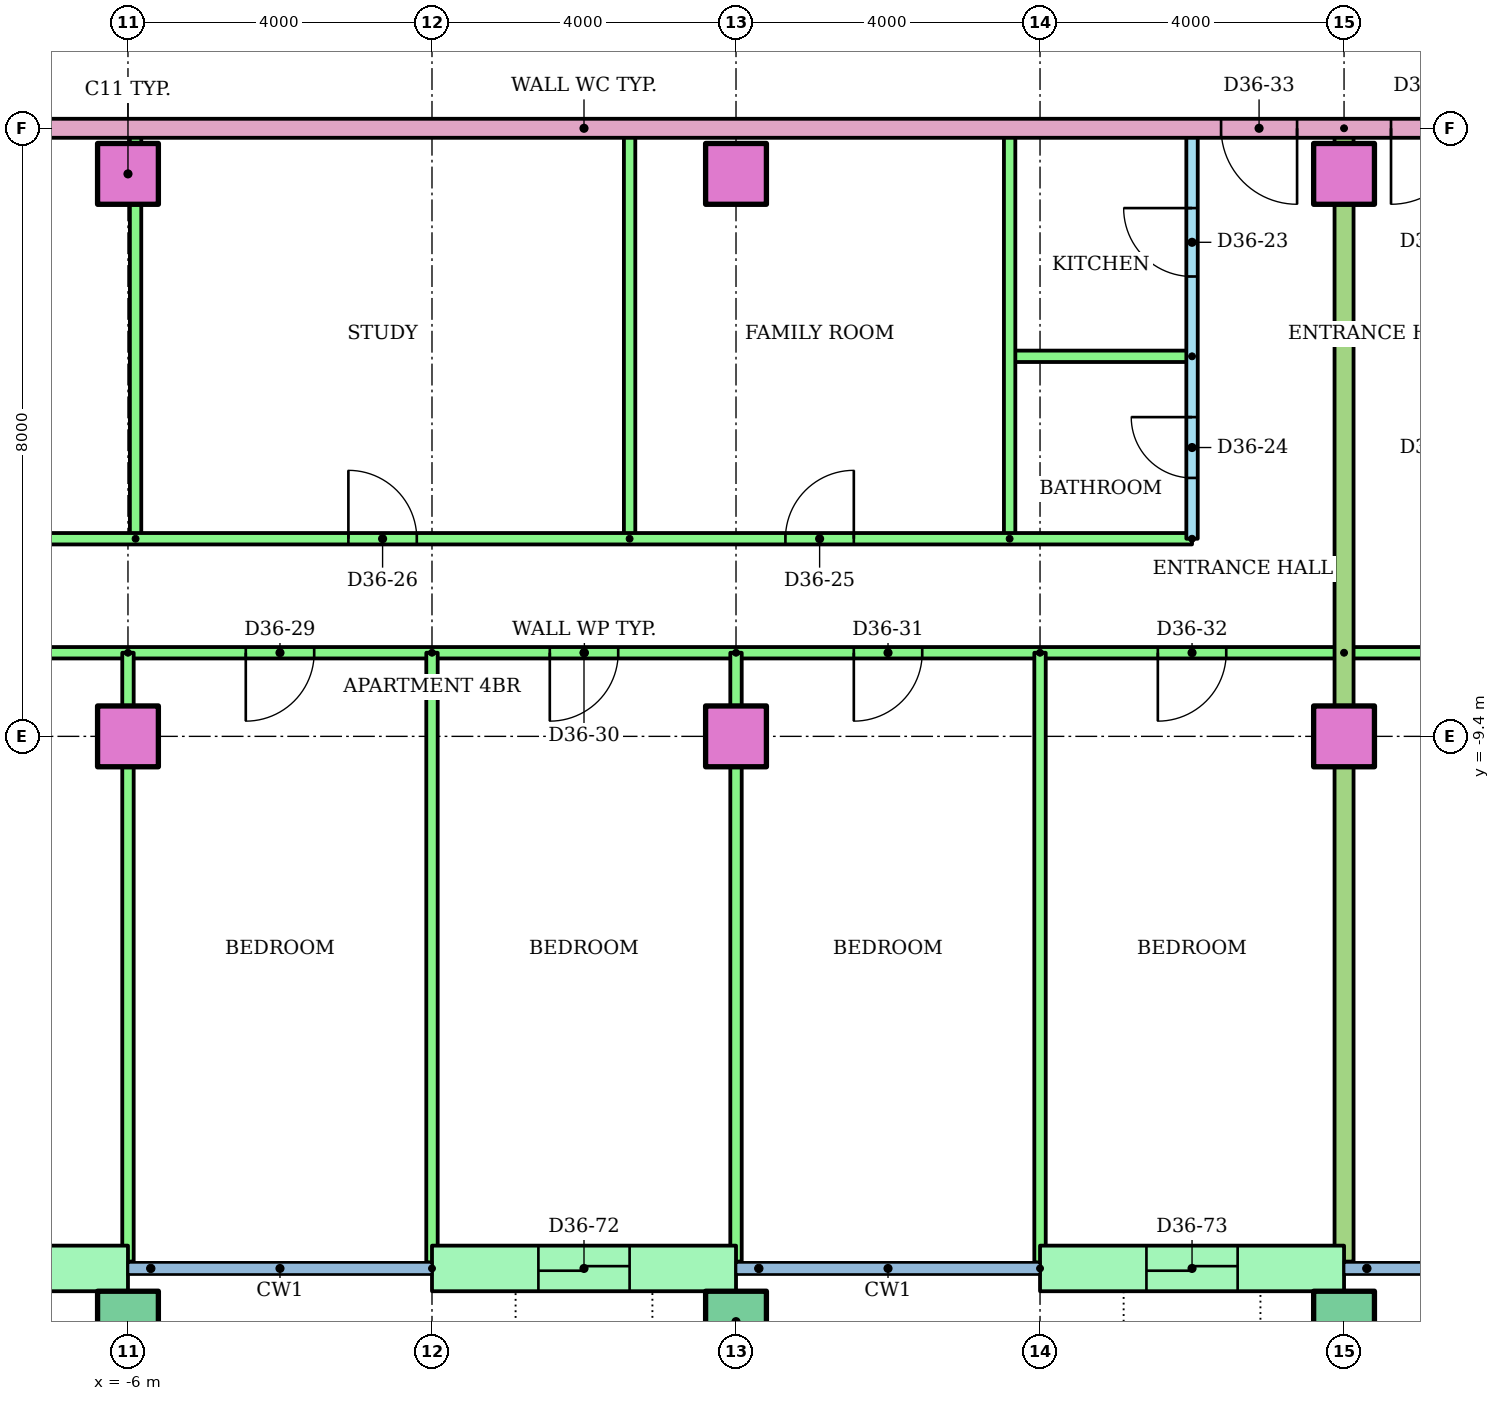
"""IFC4 building model, lengths in metres.
Left out: names, types, materials, properties, quantities, classifications, styles, units other than length and angle.
Written with IfcOpenShell. Run it as: python <this file> out.ifc"""

import sys

from ifc_helpers import new_model, si_unit, direction, frame, frame_2d, origin, origin_2d, place, context, subcontext, project, spatial, rectangle, hollow_rectangle, extrude, element, fill, save


model = new_model("IFC4")
c1 = context("Model", 3, precision=1e-05, world=origin(), true_north=direction((0.0, 1.0)))
c2 = subcontext(c1, "Body", "Model", "MODEL_VIEW")
j1 = project(units=[si_unit("LENGTHUNIT", "METRE"), si_unit("PLANEANGLEUNIT", "RADIAN")], contexts=[c1])
p1 = place(None, origin())
s1 = spatial("IfcSite", under=j1, at=p1, CompositionType="ELEMENT")
p2 = place(p1, origin())
s2 = spatial("IfcBuilding", under=s1, at=p2, CompositionType="ELEMENT")
p3 = place(p2, frame((0.0, 0.0, 139.0)))
s3 = spatial("IfcBuildingStorey", under=s2, at=p3, CompositionType="ELEMENT", Elevation=139.0)
for number, where in (
    (1, (-6.0, -17.1, 0.0)),
    (2, (2.0, -17.1, 0.0)),
    (3, (10.0, -17.1, 0.0)),
):
    element("IfcColumn", number, at=place(p3, frame(where)), inside=s3, PredefinedType="COLUMN", context=c2, shape_type="SweptSolid", body=[
        extrude(hollow_rectangle(XDim=0.8, YDim=0.8, WallThickness=0.04, at=origin_2d()), origin(), (0.0, 0.0, 1.0), 3.2),
    ])
for number, where in (
    (4, (-6.0, -9.4, 0.0)),
    (5, (2.0, -9.4, 0.0)),
    (6, (10.0, -9.4, 0.0)),
    (7, (-6.0, -2.0, 0.0)),
    (8, (2.0, -2.0, 0.0)),
    (9, (10.0, -2.0, 0.0)),
):
    element("IfcColumn", number, at=place(p3, frame(where)), inside=s3, PredefinedType="COLUMN", context=c2, shape_type="SweptSolid", body=[
        extrude(rectangle(XDim=0.8, YDim=0.8, at=origin_2d()), origin(), (0.0, 0.0, 1.0), 3.2),
    ])
p4 = place(p3, frame((-10.0, -16.4, 0.0)))
e10 = element("IfcWall", 10, at=p4, inside=s3, PredefinedType="STANDARD", context=c2, shape_type="SweptSolid", body=[
    extrude(rectangle(XDim=4.0, YDim=0.6, at=frame_2d((2.0, 0.0))), origin(), (0.0, 0.0, 1.0), 2.92),
])
p5 = place(p4, frame((1.4, 0.0, 0.0)))
e11 = element("IfcOpeningElement", 11, at=p5, cuts=e10, PredefinedType="OPENING", context=c2, shape_type="SweptSolid", body=[
    extrude(rectangle(XDim=1.2, YDim=2.1, at=frame_2d((0.6, 1.05))), frame((0.0, 0.31, 0.0), z_axis=(0.0, -1.0, 0.0), x_axis=(1.0, 0.0, 0.0)), (0.0, 0.0, 1.0), 0.62),
])
p6 = place(p3, frame((-2.0, -16.4, 0.0)))
e12 = element("IfcWall", 12, at=p6, inside=s3, PredefinedType="STANDARD", context=c2, shape_type="SweptSolid", body=[
    extrude(rectangle(XDim=4.0, YDim=0.6, at=frame_2d((2.0, 0.0))), origin(), (0.0, 0.0, 1.0), 2.92),
])
p7 = place(p6, frame((1.4, 0.0, 0.0)))
e13 = element("IfcOpeningElement", 13, at=p7, cuts=e12, PredefinedType="OPENING", context=c2, shape_type="SweptSolid", body=[
    extrude(rectangle(XDim=1.2, YDim=2.1, at=frame_2d((0.6, 1.05))), frame((0.0, 0.31, 0.0), z_axis=(0.0, -1.0, 0.0), x_axis=(1.0, 0.0, 0.0)), (0.0, 0.0, 1.0), 0.62),
])
p8 = place(p3, frame((6.0, -16.4, 0.0)))
e14 = element("IfcWall", 14, at=p8, inside=s3, PredefinedType="STANDARD", context=c2, shape_type="SweptSolid", body=[
    extrude(rectangle(XDim=4.0, YDim=0.6, at=frame_2d((2.0, 0.0))), origin(), (0.0, 0.0, 1.0), 2.92),
])
p9 = place(p8, frame((1.4, 0.0, 0.0)))
e15 = element("IfcOpeningElement", 15, at=p9, cuts=e14, PredefinedType="OPENING", context=c2, shape_type="SweptSolid", body=[
    extrude(rectangle(XDim=1.2, YDim=2.1, at=frame_2d((0.6, 1.05))), frame((0.0, 0.31, 0.0), z_axis=(0.0, -1.0, 0.0), x_axis=(1.0, 0.0, 0.0)), (0.0, 0.0, 1.0), 0.62),
])
p10 = place(p3, frame((8.0, -6.8, 0.0), z_axis=(0.0, 0.0, 1.0), x_axis=(0.0, 1.0, 0.0)))
e16 = element("IfcWall", 16, at=p10, inside=s3, PredefinedType="PARTITIONING", context=c2, shape_type="SweptSolid", body=[
    extrude(rectangle(XDim=5.4, YDim=0.15, at=frame_2d((2.7, 0.0))), origin(), (0.0, 0.0, 1.0), 2.4),
])
p11 = place(p10, frame((3.45, 0.0, 0.0)))
e17 = element("IfcOpeningElement", 17, at=p11, cuts=e16, PredefinedType="OPENING", context=c2, shape_type="SweptSolid", body=[
    extrude(rectangle(XDim=0.9, YDim=2.1, at=frame_2d((0.45, 1.05))), frame((0.0, 0.085, 0.0), z_axis=(0.0, -1.0, 0.0), x_axis=(1.0, 0.0, 0.0)), (0.0, 0.0, 1.0), 0.17),
])
p12 = place(p10, frame((0.8, 0.0, 0.0)))
e18 = element("IfcOpeningElement", 18, at=p12, cuts=e16, PredefinedType="OPENING", context=c2, shape_type="SweptSolid", body=[
    extrude(rectangle(XDim=0.8, YDim=2.1, at=frame_2d((0.4, 1.05))), frame((0.0, 0.085, 0.0), z_axis=(0.0, -1.0, 0.0), x_axis=(1.0, 0.0, 0.0)), (0.0, 0.0, 1.0), 0.17),
])
p13 = place(p3, frame((8.0, -4.4, 0.0), z_axis=(0.0, 0.0, 1.0), x_axis=(-1.0, 0.0, 0.0)))
e19 = element("IfcWall", 19, at=p13, inside=s3, PredefinedType="PARTITIONING", context=c2, shape_type="SweptSolid", body=[
    extrude(rectangle(XDim=2.4, YDim=0.15, at=frame_2d((1.2, 0.0))), origin(), (0.0, 0.0, 1.0), 2.4),
])
for number, where, z_axis, x_axis in (
    (20, (5.6, -6.8, 0.0), (0.0, 0.0, 1.0), (0.0, 1.0, 0.0)),
    (21, (0.6, -6.8, 0.0), (0.0, 0.0, 1.0), (0.0, 1.0, 0.0)),
    (22, (-5.9, -6.8, 0.0), (0.0, 0.0, 1.0), (0.0, 1.0, 0.0)),
):
    element("IfcWall", number, at=place(p3, frame(where, z_axis=z_axis, x_axis=x_axis)), inside=s3, PredefinedType="PARTITIONING", context=c2, shape_type="SweptSolid", body=[
        extrude(rectangle(XDim=5.4, YDim=0.15, at=frame_2d((2.7, 0.0))), origin(), (0.0, 0.0, 1.0), 2.4),
    ])
p14 = place(p3, frame((-14.0, -6.8, 0.0)))
e23 = element("IfcWall", 23, at=p14, inside=s3, PredefinedType="PARTITIONING", context=c2, shape_type="SweptSolid", body=[
    extrude(rectangle(XDim=22.0, YDim=0.15, at=frame_2d((11.0, 0.0))), origin(), (0.0, 0.0, 1.0), 2.4),
])
p15 = place(p14, frame((16.65, 0.0, 0.0)))
e24 = element("IfcOpeningElement", 24, at=p15, cuts=e23, PredefinedType="OPENING", context=c2, shape_type="SweptSolid", body=[
    extrude(rectangle(XDim=0.9, YDim=2.1, at=frame_2d((0.45, 1.05))), frame((0.0, 0.085, 0.0), z_axis=(0.0, -1.0, 0.0), x_axis=(1.0, 0.0, 0.0)), (0.0, 0.0, 1.0), 0.17),
])
p16 = place(p14, frame((10.9, 0.0, 0.0)))
e25 = element("IfcOpeningElement", 25, at=p16, cuts=e23, PredefinedType="OPENING", context=c2, shape_type="SweptSolid", body=[
    extrude(rectangle(XDim=0.9, YDim=2.1, at=frame_2d((0.45, 1.05))), frame((0.0, 0.085, 0.0), z_axis=(0.0, -1.0, 0.0), x_axis=(1.0, 0.0, 0.0)), (0.0, 0.0, 1.0), 0.17),
])
p17 = place(p14, frame((3.6, 0.0, 0.0)))
e26 = element("IfcOpeningElement", 26, at=p17, cuts=e23, PredefinedType="OPENING", context=c2, shape_type="SweptSolid", body=[
    extrude(rectangle(XDim=0.9, YDim=2.1, at=frame_2d((0.45, 1.05))), frame((0.0, 0.085, 0.0), z_axis=(0.0, -1.0, 0.0), x_axis=(1.0, 0.0, 0.0)), (0.0, 0.0, 1.0), 0.17),
])
p18 = place(p3, frame((10.0, -8.3, 0.0), z_axis=(0.0, 0.0, 1.0), x_axis=(-1.0, 0.0, 0.0)))
e27 = element("IfcWall", 27, at=p18, inside=s3, PredefinedType="PARTITIONING", context=c2, shape_type="SweptSolid", body=[
    extrude(rectangle(XDim=24.0, YDim=0.15, at=frame_2d((12.0, 0.0))), origin(), (0.0, 0.0, 1.0), 2.4),
])
p19 = place(p18, frame((19.5, 0.0, 0.0)))
e28 = element("IfcOpeningElement", 28, at=p19, cuts=e27, PredefinedType="OPENING", context=c2, shape_type="SweptSolid", body=[
    extrude(rectangle(XDim=1.0, YDim=2.1, at=frame_2d((0.5, 1.05))), frame((0.0, 0.085, 0.0), z_axis=(0.0, -1.0, 0.0), x_axis=(1.0, 0.0, 0.0)), (0.0, 0.0, 1.0), 0.17),
])
p20 = place(p18, frame((13.55, 0.0, 0.0)))
e29 = element("IfcOpeningElement", 29, at=p20, cuts=e27, PredefinedType="OPENING", context=c2, shape_type="SweptSolid", body=[
    extrude(rectangle(XDim=0.9, YDim=2.1, at=frame_2d((0.45, 1.05))), frame((0.0, 0.085, 0.0), z_axis=(0.0, -1.0, 0.0), x_axis=(1.0, 0.0, 0.0)), (0.0, 0.0, 1.0), 0.17),
])
p21 = place(p18, frame((9.55, 0.0, 0.0)))
e30 = element("IfcOpeningElement", 30, at=p21, cuts=e27, PredefinedType="OPENING", context=c2, shape_type="SweptSolid", body=[
    extrude(rectangle(XDim=0.9, YDim=2.1, at=frame_2d((0.45, 1.05))), frame((0.0, 0.085, 0.0), z_axis=(0.0, -1.0, 0.0), x_axis=(1.0, 0.0, 0.0)), (0.0, 0.0, 1.0), 0.17),
])
p22 = place(p18, frame((5.55, 0.0, 0.0)))
e31 = element("IfcOpeningElement", 31, at=p22, cuts=e27, PredefinedType="OPENING", context=c2, shape_type="SweptSolid", body=[
    extrude(rectangle(XDim=0.9, YDim=2.1, at=frame_2d((0.45, 1.05))), frame((0.0, 0.085, 0.0), z_axis=(0.0, -1.0, 0.0), x_axis=(1.0, 0.0, 0.0)), (0.0, 0.0, 1.0), 0.17),
])
p23 = place(p18, frame((1.55, 0.0, 0.0)))
e32 = element("IfcOpeningElement", 32, at=p23, cuts=e27, PredefinedType="OPENING", context=c2, shape_type="SweptSolid", body=[
    extrude(rectangle(XDim=0.9, YDim=2.1, at=frame_2d((0.45, 1.05))), frame((0.0, 0.085, 0.0), z_axis=(0.0, -1.0, 0.0), x_axis=(1.0, 0.0, 0.0)), (0.0, 0.0, 1.0), 0.17),
])
p24 = place(p3, frame((-6.0, -8.3, 0.0), z_axis=(0.0, 0.0, 1.0), x_axis=(0.0, -1.0, 0.0)))
e33 = element("IfcWall", 33, at=p24, inside=s3, PredefinedType="PARTITIONING", context=c2, shape_type="SweptSolid", body=[
    extrude(rectangle(XDim=8.01, YDim=0.15, at=frame_2d((4.005, 0.0))), origin(), (0.0, 0.0, 1.0), 2.4),
])
p25 = place(p3, frame((-2.0, -8.3, 0.0), z_axis=(0.0, 0.0, 1.0), x_axis=(0.0, -1.0, 0.0)))
e34 = element("IfcWall", 34, at=p25, inside=s3, PredefinedType="PARTITIONING", context=c2, shape_type="SweptSolid", body=[
    extrude(rectangle(XDim=8.021, YDim=0.15, at=frame_2d((4.01, 0.0))), origin(), (0.0, 0.0, 1.0), 2.4),
])
p26 = place(p3, frame((2.0, -8.3, 0.0), z_axis=(0.0, 0.0, 1.0), x_axis=(0.0, -1.0, 0.0)))
e35 = element("IfcWall", 35, at=p26, inside=s3, PredefinedType="PARTITIONING", context=c2, shape_type="SweptSolid", body=[
    extrude(rectangle(XDim=8.01, YDim=0.15, at=frame_2d((4.005, 0.0))), origin(), (0.0, 0.0, 1.0), 2.4),
])
p27 = place(p3, frame((6.0, -8.3, 0.0), z_axis=(0.0, 0.0, 1.0), x_axis=(0.0, -1.0, 0.0)))
e36 = element("IfcWall", 36, at=p27, inside=s3, PredefinedType="PARTITIONING", context=c2, shape_type="SweptSolid", body=[
    extrude(rectangle(XDim=8.021, YDim=0.15, at=frame_2d((4.01, 0.0))), origin(), (0.0, 0.0, 1.0), 2.4),
])
p28 = place(p3, frame((32.72, -8.3, 0.0), z_axis=(0.0, 0.0, 1.0), x_axis=(-1.0, 0.0, 0.0)))
e37 = element("IfcWall", 37, at=p28, inside=s3, PredefinedType="PARTITIONING", context=c2, shape_type="SweptSolid", body=[
    extrude(rectangle(XDim=22.72, YDim=0.15, at=frame_2d((11.36, 0.0))), origin(), (0.0, 0.0, 1.0), 2.4),
])
p29 = place(p28, frame((20.27, 0.0, 0.0)))
e38 = element("IfcOpeningElement", 38, at=p29, cuts=e37, PredefinedType="OPENING", context=c2, shape_type="SweptSolid", body=[
    extrude(rectangle(XDim=0.9, YDim=2.1, at=frame_2d((0.45, 1.05))), frame((0.0, 0.085, 0.0), z_axis=(0.0, -1.0, 0.0), x_axis=(1.0, 0.0, 0.0)), (0.0, 0.0, 1.0), 0.17),
])
p30 = place(p28, frame((16.27, 0.0, 0.0)))
e39 = element("IfcOpeningElement", 39, at=p30, cuts=e37, PredefinedType="OPENING", context=c2, shape_type="SweptSolid", body=[
    extrude(rectangle(XDim=0.9, YDim=2.1, at=frame_2d((0.45, 1.05))), frame((0.0, 0.085, 0.0), z_axis=(0.0, -1.0, 0.0), x_axis=(1.0, 0.0, 0.0)), (0.0, 0.0, 1.0), 0.17),
])
p31 = place(p28, frame((12.27, 0.0, 0.0)))
e40 = element("IfcOpeningElement", 40, at=p31, cuts=e37, PredefinedType="OPENING", context=c2, shape_type="SweptSolid", body=[
    extrude(rectangle(XDim=0.9, YDim=2.1, at=frame_2d((0.45, 1.05))), frame((0.0, 0.085, 0.0), z_axis=(0.0, -1.0, 0.0), x_axis=(1.0, 0.0, 0.0)), (0.0, 0.0, 1.0), 0.17),
])
p32 = place(p28, frame((8.22, 0.0, 0.0)))
e41 = element("IfcOpeningElement", 41, at=p32, cuts=e37, PredefinedType="OPENING", context=c2, shape_type="SweptSolid", body=[
    extrude(rectangle(XDim=1.0, YDim=2.1, at=frame_2d((0.5, 1.05))), frame((0.0, 0.085, 0.0), z_axis=(0.0, -1.0, 0.0), x_axis=(1.0, 0.0, 0.0)), (0.0, 0.0, 1.0), 0.17),
])
p33 = place(p28, frame((3.02, 0.0, 0.0)))
e42 = element("IfcOpeningElement", 42, at=p33, cuts=e37, PredefinedType="OPENING", context=c2, shape_type="SweptSolid", body=[
    extrude(rectangle(XDim=0.9, YDim=2.1, at=frame_2d((0.45, 1.05))), frame((0.0, 0.085, 0.0), z_axis=(0.0, -1.0, 0.0), x_axis=(1.0, 0.0, 0.0)), (0.0, 0.0, 1.0), 0.17),
])
p34 = place(p3, frame((10.0, -1.4, 0.0), z_axis=(0.0, 0.0, 1.0), x_axis=(0.0, -1.0, 0.0)))
e43 = element("IfcWall", 43, at=p34, inside=s3, PredefinedType="PARTITIONING", context=c2, shape_type="SweptSolid", body=[
    extrude(rectangle(XDim=14.91, YDim=0.25, at=frame_2d((7.455, 0.0))), origin(), (0.0, 0.0, 1.0), 2.4),
])
p35 = place(p3, frame((14.0, -1.4, 0.0), z_axis=(0.0, 0.0, 1.0), x_axis=(-1.0, 0.0, 0.0)))
e44 = element("IfcWall", 44, at=p35, inside=s3, PredefinedType="PARTITIONING", context=c2, shape_type="SweptSolid", body=[
    extrude(rectangle(XDim=28.0, YDim=0.25, at=frame_2d((14.0, 0.0))), origin(), (0.0, 0.0, 1.0), 2.4),
])
p36 = place(p35, frame((4.618, 0.0, 0.0)))
e45 = element("IfcOpeningElement", 45, at=p36, cuts=e44, PredefinedType="OPENING", context=c2, shape_type="SweptSolid", body=[
    extrude(rectangle(XDim=1.0, YDim=2.1, at=frame_2d((0.5, 1.05))), frame((0.0, 0.135, 0.0), z_axis=(0.0, -1.0, 0.0), x_axis=(1.0, 0.0, 0.0)), (0.0, 0.0, 1.0), 0.27),
])
p37 = place(p35, frame((2.382, 0.0, 0.0)))
e46 = element("IfcOpeningElement", 46, at=p37, cuts=e44, PredefinedType="OPENING", context=c2, shape_type="SweptSolid", body=[
    extrude(rectangle(XDim=1.0, YDim=2.1, at=frame_2d((0.5, 1.05))), frame((0.0, 0.135, 0.0), z_axis=(0.0, -1.0, 0.0), x_axis=(1.0, 0.0, 0.0)), (0.0, 0.0, 1.0), 0.27),
])
p38 = place(p11, origin())
e47 = element("IfcDoor", 47, at=p38, inside=s3, OperationType="SINGLE_SWING_RIGHT", PredefinedType="DOOR", context=c2, shape_type="SweptSolid", body=[
    extrude(rectangle(XDim=0.9, YDim=2.1, at=frame_2d((0.45, 1.05))), frame((0.0, 0.025, 0.0), z_axis=(0.0, -1.0, 0.0), x_axis=(1.0, 0.0, 0.0)), (0.0, 0.0, 1.0), 0.05),
])
fill(e17, e47)
p39 = place(p12, origin())
e48 = element("IfcDoor", 48, at=p39, inside=s3, OperationType="SINGLE_SWING_RIGHT", PredefinedType="DOOR", context=c2, shape_type="SweptSolid", body=[
    extrude(rectangle(XDim=0.8, YDim=2.1, at=frame_2d((0.4, 1.05))), frame((0.0, 0.025, 0.0), z_axis=(0.0, -1.0, 0.0), x_axis=(1.0, 0.0, 0.0)), (0.0, 0.0, 1.0), 0.05),
])
fill(e18, e48)
p40 = place(p15, origin())
e49 = element("IfcDoor", 49, at=p40, inside=s3, OperationType="SINGLE_SWING_RIGHT", PredefinedType="DOOR", context=c2, shape_type="SweptSolid", body=[
    extrude(rectangle(XDim=0.9, YDim=2.1, at=frame_2d((0.45, 1.05))), frame((0.0, 0.025, 0.0), z_axis=(0.0, -1.0, 0.0), x_axis=(1.0, 0.0, 0.0)), (0.0, 0.0, 1.0), 0.05),
])
fill(e24, e49)
p41 = place(p16, origin())
e50 = element("IfcDoor", 50, at=p41, inside=s3, OperationType="SINGLE_SWING_LEFT", PredefinedType="DOOR", context=c2, shape_type="SweptSolid", body=[
    extrude(rectangle(XDim=0.9, YDim=2.1, at=frame_2d((0.45, 1.05))), frame((0.0, 0.025, 0.0), z_axis=(0.0, -1.0, 0.0), x_axis=(1.0, 0.0, 0.0)), (0.0, 0.0, 1.0), 0.05),
])
fill(e25, e50)
p42 = place(p20, origin())
e51 = element("IfcDoor", 51, at=p42, inside=s3, OperationType="SINGLE_SWING_RIGHT", PredefinedType="DOOR", context=c2, shape_type="SweptSolid", body=[
    extrude(rectangle(XDim=0.9, YDim=2.1, at=frame_2d((0.45, 1.05))), frame((0.0, 0.025, 0.0), z_axis=(0.0, -1.0, 0.0), x_axis=(1.0, 0.0, 0.0)), (0.0, 0.0, 1.0), 0.05),
])
fill(e29, e51)
p43 = place(p21, origin())
e52 = element("IfcDoor", 52, at=p43, inside=s3, OperationType="SINGLE_SWING_RIGHT", PredefinedType="DOOR", context=c2, shape_type="SweptSolid", body=[
    extrude(rectangle(XDim=0.9, YDim=2.1, at=frame_2d((0.45, 1.05))), frame((0.0, 0.025, 0.0), z_axis=(0.0, -1.0, 0.0), x_axis=(1.0, 0.0, 0.0)), (0.0, 0.0, 1.0), 0.05),
])
fill(e30, e52)
p44 = place(p22, origin())
e53 = element("IfcDoor", 53, at=p44, inside=s3, OperationType="SINGLE_SWING_RIGHT", PredefinedType="DOOR", context=c2, shape_type="SweptSolid", body=[
    extrude(rectangle(XDim=0.9, YDim=2.1, at=frame_2d((0.45, 1.05))), frame((0.0, 0.025, 0.0), z_axis=(0.0, -1.0, 0.0), x_axis=(1.0, 0.0, 0.0)), (0.0, 0.0, 1.0), 0.05),
])
fill(e31, e53)
p45 = place(p23, origin())
e54 = element("IfcDoor", 54, at=p45, inside=s3, OperationType="SINGLE_SWING_RIGHT", PredefinedType="DOOR", context=c2, shape_type="SweptSolid", body=[
    extrude(rectangle(XDim=0.9, YDim=2.1, at=frame_2d((0.45, 1.05))), frame((0.0, 0.025, 0.0), z_axis=(0.0, -1.0, 0.0), x_axis=(1.0, 0.0, 0.0)), (0.0, 0.0, 1.0), 0.05),
])
fill(e32, e54)
p46 = place(p36, origin())
e55 = element("IfcDoor", 55, at=p46, inside=s3, OperationType="SINGLE_SWING_LEFT", PredefinedType="DOOR", context=c2, shape_type="SweptSolid", body=[
    extrude(rectangle(XDim=1.0, YDim=2.1, at=frame_2d((0.5, 1.05))), frame((0.0, 0.025, 0.0), z_axis=(0.0, -1.0, 0.0), x_axis=(1.0, 0.0, 0.0)), (0.0, 0.0, 1.0), 0.05),
])
fill(e45, e55)
p47 = place(p37, origin())
e56 = element("IfcDoor", 56, at=p47, inside=s3, OperationType="SINGLE_SWING_RIGHT", PredefinedType="DOOR", context=c2, shape_type="SweptSolid", body=[
    extrude(rectangle(XDim=1.0, YDim=2.1, at=frame_2d((0.5, 1.05))), frame((0.0, 0.025, 0.0), z_axis=(0.0, -1.0, 0.0), x_axis=(1.0, 0.0, 0.0)), (0.0, 0.0, 1.0), 0.05),
])
fill(e46, e56)
p48 = place(p7, origin())
e57 = element("IfcDoor", 57, at=p48, inside=s3, OperationType="SLIDING_TO_LEFT", PredefinedType="DOOR", context=c2, shape_type="SweptSolid", body=[
    extrude(rectangle(XDim=1.2, YDim=2.1, at=frame_2d((0.6, 1.05))), frame((0.0, 0.025, 0.0), z_axis=(0.0, -1.0, 0.0), x_axis=(1.0, 0.0, 0.0)), (0.0, 0.0, 1.0), 0.05),
])
fill(e13, e57)
p49 = place(p9, origin())
e58 = element("IfcDoor", 58, at=p49, inside=s3, OperationType="SLIDING_TO_LEFT", PredefinedType="DOOR", context=c2, shape_type="SweptSolid", body=[
    extrude(rectangle(XDim=1.2, YDim=2.1, at=frame_2d((0.6, 1.05))), frame((0.0, 0.025, 0.0), z_axis=(0.0, -1.0, 0.0), x_axis=(1.0, 0.0, 0.0)), (0.0, 0.0, 1.0), 0.05),
])
fill(e15, e58)
save(model, sys.argv[1])
